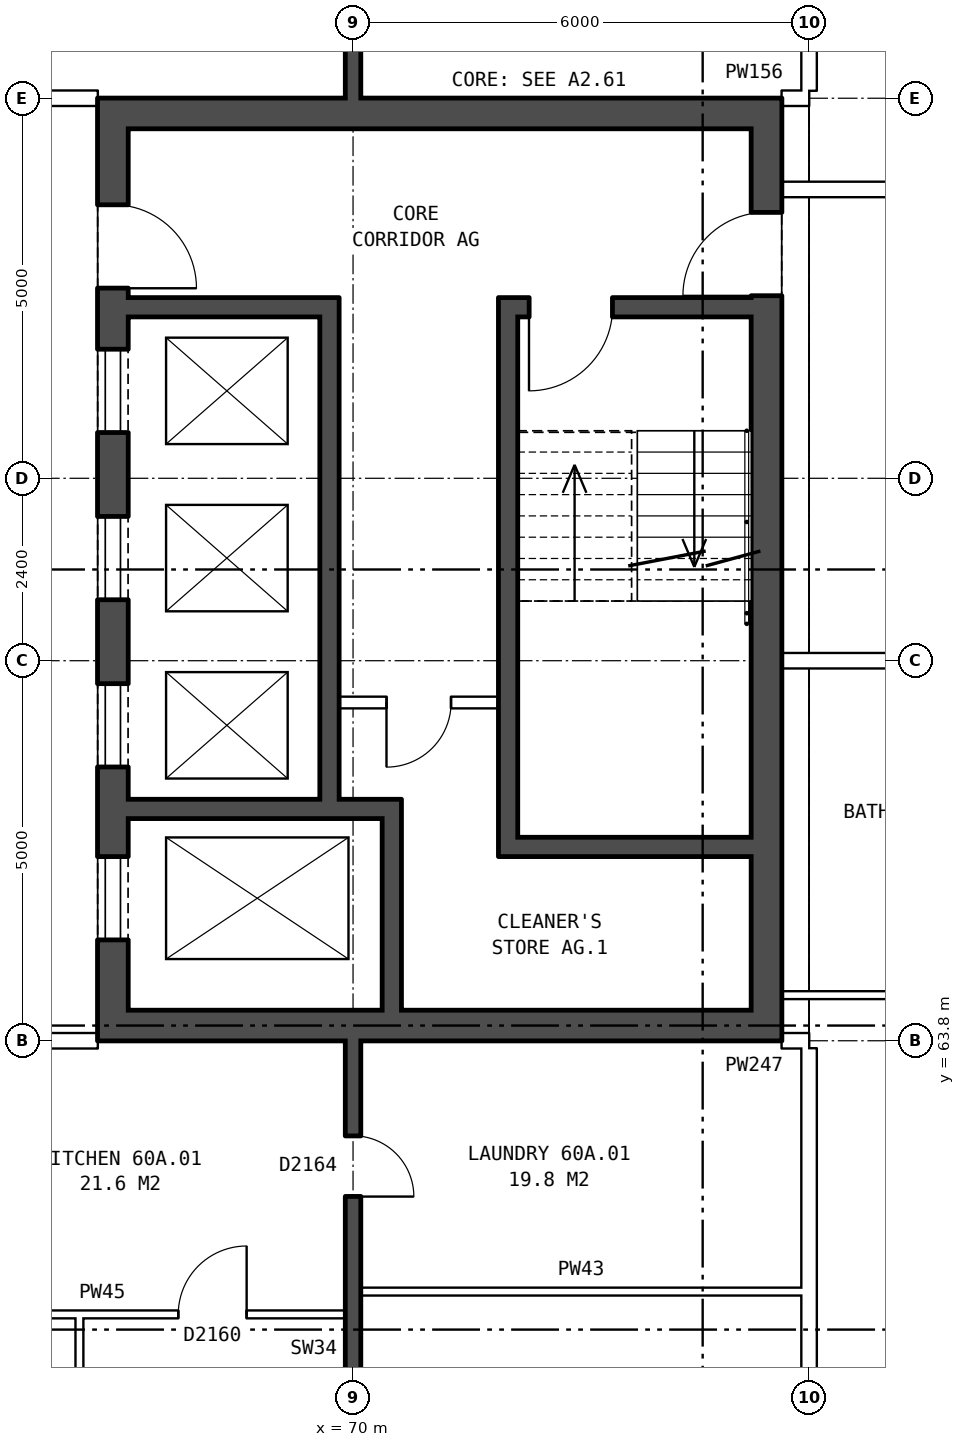
"""IFC4 building model, lengths in metres.
Left out: names, types, materials, properties, quantities, classifications, styles, units other than length and angle.
Written with IfcOpenShell. Run it as: python <this file> out.ifc"""

import sys

from ifc_helpers import new_model, si_unit, direction, frame, frame_2d, origin, place, context, subcontext, project, spatial, rectangle, extrude, element, fill, save


model = new_model("IFC4")
c1 = context("Model", 3, precision=1e-05, world=origin(), true_north=direction((0.0, 1.0)))
c2 = subcontext(c1, "Body", "Model", "MODEL_VIEW")
j1 = project(units=[si_unit("LENGTHUNIT", "METRE"), si_unit("PLANEANGLEUNIT", "RADIAN")], contexts=[c1])
p1 = place(None, origin())
s1 = spatial("IfcSite", under=j1, at=p1, CompositionType="ELEMENT")
p2 = place(p1, origin())
s2 = spatial("IfcBuilding", under=s1, at=p2, CompositionType="ELEMENT")
p3 = place(p2, frame((0.0, 0.0, 212.1)))
s3 = spatial("IfcBuildingStorey", under=s2, at=p3, CompositionType="ELEMENT", Elevation=212.1)
p4 = place(p3, frame((66.84, 63.8, 0.0), z_axis=(0.0, 0.0, 1.0), x_axis=(0.0, 1.0, 0.0)))
e1 = element("IfcWall", 1, at=p4, inside=s3, PredefinedType="SHEAR", context=c2, shape_type="SweptSolid", body=[
    extrude(rectangle(XDim=12.4, YDim=0.4, at=frame_2d((6.2, 0.0))), origin(), (0.0, 0.0, 1.0), 2.85),
])
p5 = place(p4, frame((1.325, 0.0, 0.0)))
e2 = element("IfcOpeningElement", 2, at=p5, cuts=e1, PredefinedType="OPENING", context=c2, shape_type="SweptSolid", body=[
    extrude(rectangle(XDim=1.1, YDim=2.1, at=frame_2d((0.55, 1.05))), frame((0.0, 0.21, 0.0), z_axis=(0.0, -1.0, 0.0), x_axis=(1.0, 0.0, 0.0)), (0.0, 0.0, 1.0), 0.42),
])
p6 = place(p4, frame((3.6, 0.0, 0.0)))
e3 = element("IfcOpeningElement", 3, at=p6, cuts=e1, PredefinedType="OPENING", context=c2, shape_type="SweptSolid", body=[
    extrude(rectangle(XDim=1.1, YDim=2.1, at=frame_2d((0.55, 1.05))), frame((0.0, 0.21, 0.0), z_axis=(0.0, -1.0, 0.0), x_axis=(1.0, 0.0, 0.0)), (0.0, 0.0, 1.0), 0.42),
])
p7 = place(p4, frame((5.8, 0.0, 0.0)))
e4 = element("IfcOpeningElement", 4, at=p7, cuts=e1, PredefinedType="OPENING", context=c2, shape_type="SweptSolid", body=[
    extrude(rectangle(XDim=1.1, YDim=2.1, at=frame_2d((0.55, 1.05))), frame((0.0, 0.21, 0.0), z_axis=(0.0, -1.0, 0.0), x_axis=(1.0, 0.0, 0.0)), (0.0, 0.0, 1.0), 0.42),
])
p8 = place(p4, frame((8.0, 0.0, 0.0)))
e5 = element("IfcOpeningElement", 5, at=p8, cuts=e1, PredefinedType="OPENING", context=c2, shape_type="SweptSolid", body=[
    extrude(rectangle(XDim=1.1, YDim=2.1, at=frame_2d((0.55, 1.05))), frame((0.0, 0.21, 0.0), z_axis=(0.0, -1.0, 0.0), x_axis=(1.0, 0.0, 0.0)), (0.0, 0.0, 1.0), 0.42),
])
p9 = place(p4, frame((9.9, 0.0, 0.0)))
e6 = element("IfcOpeningElement", 6, at=p9, cuts=e1, PredefinedType="OPENING", context=c2, shape_type="SweptSolid", body=[
    extrude(rectangle(XDim=1.1, YDim=2.1, at=frame_2d((0.55, 1.05))), frame((0.0, 0.21, 0.0), z_axis=(0.0, -1.0, 0.0), x_axis=(1.0, 0.0, 0.0)), (0.0, 0.0, 1.0), 0.42),
])
p10 = place(p3, frame((75.44, 63.8, 0.0), z_axis=(0.0, 0.0, 1.0), x_axis=(0.0, 1.0, 0.0)))
e7 = element("IfcWall", 7, at=p10, inside=s3, PredefinedType="SHEAR", context=c2, shape_type="SweptSolid", body=[
    extrude(rectangle(XDim=12.4, YDim=0.4, at=frame_2d((6.2, 0.0))), origin(), (0.0, 0.0, 1.0), 2.85),
])
p11 = place(p10, frame((9.8, 0.0, 0.0)))
e8 = element("IfcOpeningElement", 8, at=p11, cuts=e7, PredefinedType="OPENING", context=c2, shape_type="SweptSolid", body=[
    extrude(rectangle(XDim=1.1, YDim=2.1, at=frame_2d((0.55, 1.05))), frame((0.0, 0.21, 0.0), z_axis=(0.0, -1.0, 0.0), x_axis=(1.0, 0.0, 0.0)), (0.0, 0.0, 1.0), 0.42),
])
for number, where, z_axis, x_axis in (
    (9, (67.04, 64.0, 0.0), (0.0, 0.0, 1.0), (1.0, 0.0, 0.0)),
    (10, (67.04, 76.0, 0.0), (0.0, 0.0, 1.0), (1.0, 0.0, 0.0)),
):
    element("IfcWall", number, at=place(p3, frame(where, z_axis=z_axis, x_axis=x_axis)), inside=s3, PredefinedType="SHEAR", context=c2, shape_type="SweptSolid", body=[
        extrude(rectangle(XDim=8.2, YDim=0.4, at=frame_2d((4.1, 0.0))), origin(), (0.0, 0.0, 1.0), 2.85),
    ])
p12 = place(p3, frame((72.165, 66.35, 0.0), z_axis=(0.0, 0.0, 1.0), x_axis=(1.0, 0.0, 0.0)))
e11 = element("IfcWall", 11, at=p12, inside=s3, PredefinedType="SHEAR", context=c2, shape_type="SweptSolid", body=[
    extrude(rectangle(XDim=3.075, YDim=0.25, at=frame_2d((1.538, 0.0))), origin(), (0.0, 0.0, 1.0), 2.85),
])
p13 = place(p3, frame((67.04, 66.85, 0.0), z_axis=(0.0, 0.0, 1.0), x_axis=(1.0, 0.0, 0.0)))
e12 = element("IfcWall", 12, at=p13, inside=s3, PredefinedType="SHEAR", context=c2, shape_type="SweptSolid", body=[
    extrude(rectangle(XDim=3.595, YDim=0.25, at=frame_2d((1.797, 0.0))), origin(), (0.0, 0.0, 1.0), 2.85),
])
p14 = place(p3, frame((69.815, 68.25, 0.0), z_axis=(0.0, 0.0, 1.0), x_axis=(1.0, 0.0, 0.0)))
e13 = element("IfcWall", 13, at=p14, inside=s3, PredefinedType="PARTITIONING", context=c2, shape_type="SweptSolid", body=[
    extrude(rectangle(XDim=2.1, YDim=0.15, at=frame_2d((1.05, 0.0))), origin(), (0.0, 0.0, 1.0), 2.85),
])
p15 = place(p14, frame((0.625, 0.0, 0.0)))
e14 = element("IfcOpeningElement", 14, at=p15, cuts=e13, PredefinedType="OPENING", context=c2, shape_type="SweptSolid", body=[
    extrude(rectangle(XDim=0.85, YDim=2.1, at=frame_2d((0.425, 1.05))), frame((0.0, 0.085, 0.0), z_axis=(0.0, -1.0, 0.0), x_axis=(1.0, 0.0, 0.0)), (0.0, 0.0, 1.0), 0.17),
])
p16 = place(p3, frame((67.04, 73.45, 0.0), z_axis=(0.0, 0.0, 1.0), x_axis=(1.0, 0.0, 0.0)))
e15 = element("IfcWall", 15, at=p16, inside=s3, PredefinedType="SHEAR", context=c2, shape_type="SweptSolid", body=[
    extrude(rectangle(XDim=2.525, YDim=0.25, at=frame_2d((1.262, 0.0))), origin(), (0.0, 0.0, 1.0), 2.85),
])
p17 = place(p3, frame((72.165, 73.45, 0.0), z_axis=(0.0, 0.0, 1.0), x_axis=(1.0, 0.0, 0.0)))
e16 = element("IfcWall", 16, at=p17, inside=s3, PredefinedType="SHEAR", context=c2, shape_type="SweptSolid", body=[
    extrude(rectangle(XDim=3.075, YDim=0.25, at=frame_2d((1.538, 0.0))), origin(), (0.0, 0.0, 1.0), 2.85),
])
p18 = place(p17, frame((0.15, 0.0, 0.0)))
e17 = element("IfcOpeningElement", 17, at=p18, cuts=e16, PredefinedType="OPENING", context=c2, shape_type="SweptSolid", body=[
    extrude(rectangle(XDim=1.1, YDim=2.1, at=frame_2d((0.55, 1.05))), frame((0.0, 0.135, 0.0), z_axis=(0.0, -1.0, 0.0), x_axis=(1.0, 0.0, 0.0)), (0.0, 0.0, 1.0), 0.27),
])
p19 = place(p3, frame((69.69, 66.975, 0.0), z_axis=(0.0, 0.0, 1.0), x_axis=(0.0, 1.0, 0.0)))
e18 = element("IfcWall", 18, at=p19, inside=s3, PredefinedType="SHEAR", context=c2, shape_type="SweptSolid", body=[
    extrude(rectangle(XDim=6.6, YDim=0.25, at=frame_2d((3.3, 0.0))), origin(), (0.0, 0.0, 1.0), 2.85),
])
p20 = place(p3, frame((70.51, 64.2, 0.0), z_axis=(0.0, 0.0, 1.0), x_axis=(0.0, 1.0, 0.0)))
e19 = element("IfcWall", 19, at=p20, inside=s3, PredefinedType="SHEAR", context=c2, shape_type="SweptSolid", body=[
    extrude(rectangle(XDim=2.525, YDim=0.25, at=frame_2d((1.263, 0.0))), origin(), (0.0, 0.0, 1.0), 2.85),
])
p21 = place(p3, frame((72.04, 66.225, 0.0), z_axis=(0.0, 0.0, 1.0), x_axis=(0.0, 1.0, 0.0)))
e20 = element("IfcWall", 20, at=p21, inside=s3, PredefinedType="SHEAR", context=c2, shape_type="SweptSolid", body=[
    extrude(rectangle(XDim=7.35, YDim=0.25, at=frame_2d((3.675, 0.0))), origin(), (0.0, 0.0, 1.0), 2.85),
])
p22 = place(p3, frame((64.1, 60.2, 0.0), z_axis=(0.0, 0.0, 1.0), x_axis=(1.0, 0.0, 0.0)))
e21 = element("IfcWall", 21, at=p22, inside=s3, PredefinedType="PARTITIONING", context=c2, shape_type="SweptSolid", body=[
    extrude(rectangle(XDim=5.8, YDim=0.1, at=frame_2d((2.9, 0.0))), origin(), (0.0, 0.0, 1.0), 2.85),
])
p23 = place(p22, frame((3.6, 0.0, 0.0)))
e22 = element("IfcOpeningElement", 22, at=p23, cuts=e21, PredefinedType="OPENING", context=c2, shape_type="SweptSolid", body=[
    extrude(rectangle(XDim=0.9, YDim=2.1, at=frame_2d((0.45, 1.05))), frame((0.0, 0.06, 0.0), z_axis=(0.0, -1.0, 0.0), x_axis=(1.0, 0.0, 0.0)), (0.0, 0.0, 1.0), 0.12),
])
p24 = place(p22, frame((0.7, 0.0, 0.0)))
e23 = element("IfcOpeningElement", 23, at=p24, cuts=e21, PredefinedType="OPENING", context=c2, shape_type="SweptSolid", body=[
    extrude(rectangle(XDim=0.9, YDim=2.1, at=frame_2d((0.45, 1.05))), frame((0.0, 0.06, 0.0), z_axis=(0.0, -1.0, 0.0), x_axis=(1.0, 0.0, 0.0)), (0.0, 0.0, 1.0), 0.12),
])
p25 = place(p3, frame((70.1, 60.5, 0.0), z_axis=(0.0, 0.0, 1.0), x_axis=(1.0, 0.0, 0.0)))
e24 = element("IfcWall", 24, at=p25, inside=s3, PredefinedType="PARTITIONING", context=c2, shape_type="SweptSolid", body=[
    extrude(rectangle(XDim=5.8, YDim=0.1, at=frame_2d((2.9, 0.0))), origin(), (0.0, 0.0, 1.0), 2.85),
])
p26 = place(p3, frame((63.64, 63.8, 0.0), z_axis=(0.0, 0.0, 1.0), x_axis=(1.0, 0.0, 0.0)))
e25 = element("IfcWall", 25, at=p26, inside=s3, PredefinedType="PARTITIONING", context=c2, shape_type="SweptSolid", body=[
    extrude(rectangle(XDim=3.0, YDim=0.2, at=frame_2d((1.5, 0.0))), origin(), (0.0, 0.0, 1.0), 2.85),
])
p27 = place(p26, frame((1.18, 0.0, 0.0)))
e26 = element("IfcOpeningElement", 26, at=p27, cuts=e25, PredefinedType="OPENING", context=c2, shape_type="SweptSolid", body=[
    extrude(rectangle(XDim=1.0, YDim=2.1, at=frame_2d((0.5, 1.05))), frame((0.0, 0.11, 0.0), z_axis=(0.0, -1.0, 0.0), x_axis=(1.0, 0.0, 0.0)), (0.0, 0.0, 1.0), 0.22),
])
p28 = place(p3, frame((75.64, 63.8, 0.0), z_axis=(0.0, 0.0, 1.0), x_axis=(1.0, 0.0, 0.0)))
e27 = element("IfcWall", 27, at=p28, inside=s3, PredefinedType="PARTITIONING", context=c2, shape_type="SweptSolid", body=[
    extrude(rectangle(XDim=0.36, YDim=0.2, at=frame_2d((0.18, 0.0))), origin(), (0.0, 0.0, 1.0), 2.85),
])
p29 = place(p3, frame((75.64, 64.4, 0.0), z_axis=(0.0, 0.0, 1.0), x_axis=(1.0, 0.0, 0.0)))
e28 = element("IfcWall", 28, at=p29, inside=s3, PredefinedType="PARTITIONING", context=c2, shape_type="SweptSolid", body=[
    extrude(rectangle(XDim=3.798, YDim=0.1, at=frame_2d((1.899, 0.0))), origin(), (0.0, 0.0, 1.0), 2.85),
])
p30 = place(p3, frame((75.64, 68.8, 0.0), z_axis=(0.0, 0.0, 1.0), x_axis=(1.0, 0.0, 0.0)))
e29 = element("IfcWall", 29, at=p30, inside=s3, PredefinedType="PARTITIONING", context=c2, shape_type="SweptSolid", body=[
    extrude(rectangle(XDim=55.72, YDim=0.2, at=frame_2d((27.86, 0.0))), origin(), (0.0, 0.0, 1.0), 2.85),
])
p31 = place(p30, frame((5.191, 0.0, 0.0)))
e30 = element("IfcOpeningElement", 30, at=p31, cuts=e29, PredefinedType="OPENING", context=c2, shape_type="SweptSolid", body=[
    extrude(rectangle(XDim=1.0, YDim=2.1, at=frame_2d((0.5, 1.05))), frame((0.0, 0.11, 0.0), z_axis=(0.0, -1.0, 0.0), x_axis=(1.0, 0.0, 0.0)), (0.0, 0.0, 1.0), 0.22),
])
p32 = place(p30, frame((15.678, 0.0, 0.0)))
e31 = element("IfcOpeningElement", 31, at=p32, cuts=e29, PredefinedType="OPENING", context=c2, shape_type="SweptSolid", body=[
    extrude(rectangle(XDim=1.0, YDim=2.1, at=frame_2d((0.5, 1.05))), frame((0.0, 0.11, 0.0), z_axis=(0.0, -1.0, 0.0), x_axis=(1.0, 0.0, 0.0)), (0.0, 0.0, 1.0), 0.22),
])
p33 = place(p30, frame((22.553, 0.0, 0.0)))
e32 = element("IfcOpeningElement", 32, at=p33, cuts=e29, PredefinedType="OPENING", context=c2, shape_type="SweptSolid", body=[
    extrude(rectangle(XDim=1.0, YDim=2.1, at=frame_2d((0.5, 1.05))), frame((0.0, 0.11, 0.0), z_axis=(0.0, -1.0, 0.0), x_axis=(1.0, 0.0, 0.0)), (0.0, 0.0, 1.0), 0.22),
])
p34 = place(p30, frame((32.866, 0.0, 0.0)))
e33 = element("IfcOpeningElement", 33, at=p34, cuts=e29, PredefinedType="OPENING", context=c2, shape_type="SweptSolid", body=[
    extrude(rectangle(XDim=1.0, YDim=2.1, at=frame_2d((0.5, 1.05))), frame((0.0, 0.11, 0.0), z_axis=(0.0, -1.0, 0.0), x_axis=(1.0, 0.0, 0.0)), (0.0, 0.0, 1.0), 0.22),
])
p35 = place(p30, frame((43.178, 0.0, 0.0)))
e34 = element("IfcOpeningElement", 34, at=p35, cuts=e29, PredefinedType="OPENING", context=c2, shape_type="SweptSolid", body=[
    extrude(rectangle(XDim=1.0, YDim=2.1, at=frame_2d((0.5, 1.05))), frame((0.0, 0.11, 0.0), z_axis=(0.0, -1.0, 0.0), x_axis=(1.0, 0.0, 0.0)), (0.0, 0.0, 1.0), 0.22),
])
p36 = place(p30, frame((50.053, 0.0, 0.0)))
e35 = element("IfcOpeningElement", 35, at=p36, cuts=e29, PredefinedType="OPENING", context=c2, shape_type="SweptSolid", body=[
    extrude(rectangle(XDim=1.0, YDim=2.1, at=frame_2d((0.5, 1.05))), frame((0.0, 0.11, 0.0), z_axis=(0.0, -1.0, 0.0), x_axis=(1.0, 0.0, 0.0)), (0.0, 0.0, 1.0), 0.22),
])
p37 = place(p3, frame((75.64, 75.0, 0.0), z_axis=(0.0, 0.0, 1.0), x_axis=(1.0, 0.0, 0.0)))
e36 = element("IfcWall", 36, at=p37, inside=s3, PredefinedType="PARTITIONING", context=c2, shape_type="SweptSolid", body=[
    extrude(rectangle(XDim=7.585, YDim=0.2, at=frame_2d((3.792, 0.0))), origin(), (0.0, 0.0, 1.0), 2.85),
])
p38 = place(p37, frame((3.343, 0.0, 0.0)))
e37 = element("IfcOpeningElement", 37, at=p38, cuts=e36, PredefinedType="OPENING", context=c2, shape_type="SweptSolid", body=[
    extrude(rectangle(XDim=0.9, YDim=2.1, at=frame_2d((0.45, 1.05))), frame((0.0, 0.11, 0.0), z_axis=(0.0, -1.0, 0.0), x_axis=(1.0, 0.0, 0.0)), (0.0, 0.0, 1.0), 0.22),
])
p39 = place(p3, frame((63.64, 76.2, 0.0), z_axis=(0.0, 0.0, 1.0), x_axis=(1.0, 0.0, 0.0)))
e38 = element("IfcWall", 38, at=p39, inside=s3, PredefinedType="PARTITIONING", context=c2, shape_type="SweptSolid", body=[
    extrude(rectangle(XDim=3.0, YDim=0.2, at=frame_2d((1.5, 0.0))), origin(), (0.0, 0.0, 1.0), 2.85),
])
p40 = place(p39, frame((1.18, 0.0, 0.0)))
e39 = element("IfcOpeningElement", 39, at=p40, cuts=e38, PredefinedType="OPENING", context=c2, shape_type="SweptSolid", body=[
    extrude(rectangle(XDim=1.0, YDim=2.1, at=frame_2d((0.5, 1.05))), frame((0.0, 0.11, 0.0), z_axis=(0.0, -1.0, 0.0), x_axis=(1.0, 0.0, 0.0)), (0.0, 0.0, 1.0), 0.22),
])
p41 = place(p3, frame((75.64, 76.2, 0.0), z_axis=(0.0, 0.0, 1.0), x_axis=(1.0, 0.0, 0.0)))
e40 = element("IfcWall", 40, at=p41, inside=s3, PredefinedType="PARTITIONING", context=c2, shape_type="SweptSolid", body=[
    extrude(rectangle(XDim=0.36, YDim=0.2, at=frame_2d((0.18, 0.0))), origin(), (0.0, 0.0, 1.0), 2.85),
])
p42 = place(p3, frame((66.4, 57.85, 0.0), z_axis=(0.0, 0.0, 1.0), x_axis=(0.0, 1.0, 0.0)))
e41 = element("IfcWall", 41, at=p42, inside=s3, PredefinedType="PARTITIONING", context=c2, shape_type="SweptSolid", body=[
    extrude(rectangle(XDim=2.3, YDim=0.1, at=frame_2d((1.15, 0.0))), origin(), (0.0, 0.0, 1.0), 2.85),
])
p43 = place(p3, frame((70.0, 54.36, 0.0), z_axis=(0.0, 0.0, 1.0), x_axis=(0.0, 1.0, 0.0)))
e42 = element("IfcWall", 42, at=p43, inside=s3, PredefinedType="SOLIDWALL", context=c2, shape_type="SweptSolid", body=[
    extrude(rectangle(XDim=9.44, YDim=0.2, at=frame_2d((4.72, 0.0))), origin(), (0.0, 0.0, 1.0), 2.85),
])
p44 = place(p43, frame((2.47, 0.0, 0.0)))
e43 = element("IfcOpeningElement", 43, at=p44, cuts=e42, PredefinedType="OPENING", context=c2, shape_type="SweptSolid", body=[
    extrude(rectangle(XDim=0.9, YDim=2.1, at=frame_2d((0.45, 1.05))), frame((0.0, 0.11, 0.0), z_axis=(0.0, -1.0, 0.0), x_axis=(1.0, 0.0, 0.0)), (0.0, 0.0, 1.0), 0.22),
])
p45 = place(p43, frame((7.39, 0.0, 0.0)))
e44 = element("IfcOpeningElement", 44, at=p45, cuts=e42, PredefinedType="OPENING", context=c2, shape_type="SweptSolid", body=[
    extrude(rectangle(XDim=0.8, YDim=2.1, at=frame_2d((0.4, 1.05))), frame((0.0, 0.11, 0.0), z_axis=(0.0, -1.0, 0.0), x_axis=(1.0, 0.0, 0.0)), (0.0, 0.0, 1.0), 0.22),
])
p46 = place(p3, frame((70.0, 76.2, 0.0), z_axis=(0.0, 0.0, 1.0), x_axis=(0.0, 1.0, 0.0)))
e45 = element("IfcWall", 45, at=p46, inside=s3, PredefinedType="SOLIDWALL", context=c2, shape_type="SweptSolid", body=[
    extrude(rectangle(XDim=9.44, YDim=0.2, at=frame_2d((4.72, 0.0))), origin(), (0.0, 0.0, 1.0), 2.85),
])
p47 = place(p46, frame((6.22, 0.0, 0.0)))
e46 = element("IfcOpeningElement", 46, at=p47, cuts=e45, PredefinedType="OPENING", context=c2, shape_type="SweptSolid", body=[
    extrude(rectangle(XDim=0.9, YDim=2.1, at=frame_2d((0.45, 1.05))), frame((0.0, 0.11, 0.0), z_axis=(0.0, -1.0, 0.0), x_axis=(1.0, 0.0, 0.0)), (0.0, 0.0, 1.0), 0.22),
])
p48 = place(p46, frame((1.25, 0.0, 0.0)))
e47 = element("IfcOpeningElement", 47, at=p48, cuts=e45, PredefinedType="OPENING", context=c2, shape_type="SweptSolid", body=[
    extrude(rectangle(XDim=0.8, YDim=2.1, at=frame_2d((0.4, 1.05))), frame((0.0, 0.11, 0.0), z_axis=(0.0, -1.0, 0.0), x_axis=(1.0, 0.0, 0.0)), (0.0, 0.0, 1.0), 0.22),
])
for number, where, z_axis, x_axis in (
    (48, (76.0, 54.36, 0.0), (0.0, 0.0, 1.0), (0.0, 1.0, 0.0)),
    (49, (76.0, 76.3, 0.0), (0.0, 0.0, 1.0), (0.0, 1.0, 0.0)),
):
    element("IfcWall", number, at=place(p3, frame(where, z_axis=z_axis, x_axis=x_axis)), inside=s3, PredefinedType="PARTITIONING", context=c2, shape_type="SweptSolid", body=[
        extrude(rectangle(XDim=9.34, YDim=0.2, at=frame_2d((4.67, 0.0))), origin(), (0.0, 0.0, 1.0), 2.85),
    ])
p49 = place(p5, origin())
e50 = element("IfcDoor", 50, at=p49, inside=s3, OperationType="DOUBLE_DOOR_SLIDING", PredefinedType="DOOR", context=c2, shape_type="SweptSolid", body=[
    extrude(rectangle(XDim=1.1, YDim=2.1, at=frame_2d((0.55, 1.05))), frame((0.0, -0.135, 0.0), z_axis=(0.0, -1.0, 0.0), x_axis=(1.0, 0.0, 0.0)), (0.0, 0.0, 1.0), 0.05),
])
fill(e2, e50)
p50 = place(p6, origin())
e51 = element("IfcDoor", 51, at=p50, inside=s3, OperationType="DOUBLE_DOOR_SLIDING", PredefinedType="DOOR", context=c2, shape_type="SweptSolid", body=[
    extrude(rectangle(XDim=1.1, YDim=2.1, at=frame_2d((0.55, 1.05))), frame((0.0, -0.135, 0.0), z_axis=(0.0, -1.0, 0.0), x_axis=(1.0, 0.0, 0.0)), (0.0, 0.0, 1.0), 0.05),
])
fill(e3, e51)
p51 = place(p7, origin())
e52 = element("IfcDoor", 52, at=p51, inside=s3, OperationType="DOUBLE_DOOR_SLIDING", PredefinedType="DOOR", context=c2, shape_type="SweptSolid", body=[
    extrude(rectangle(XDim=1.1, YDim=2.1, at=frame_2d((0.55, 1.05))), frame((0.0, -0.135, 0.0), z_axis=(0.0, -1.0, 0.0), x_axis=(1.0, 0.0, 0.0)), (0.0, 0.0, 1.0), 0.05),
])
fill(e4, e52)
p52 = place(p8, origin())
e53 = element("IfcDoor", 53, at=p52, inside=s3, OperationType="DOUBLE_DOOR_SLIDING", PredefinedType="DOOR", context=c2, shape_type="SweptSolid", body=[
    extrude(rectangle(XDim=1.1, YDim=2.1, at=frame_2d((0.55, 1.05))), frame((0.0, -0.135, 0.0), z_axis=(0.0, -1.0, 0.0), x_axis=(1.0, 0.0, 0.0)), (0.0, 0.0, 1.0), 0.05),
])
fill(e5, e53)
p53 = place(p9, frame((1.1, 0.0, 0.0), z_axis=(0.0, 0.0, 1.0), x_axis=(-1.0, 0.0, 0.0)))
e54 = element("IfcDoor", 54, at=p53, inside=s3, OperationType="SINGLE_SWING_RIGHT", PredefinedType="DOOR", context=c2, shape_type="SweptSolid", body=[
    extrude(rectangle(XDim=1.1, YDim=2.1, at=frame_2d((0.55, 1.05))), frame((0.0, 0.185, 0.0), z_axis=(0.0, -1.0, 0.0), x_axis=(1.0, 0.0, 0.0)), (0.0, 0.0, 1.0), 0.05),
])
fill(e6, e54)
p54 = place(p18, frame((1.1, 0.0, 0.0), z_axis=(0.0, 0.0, 1.0), x_axis=(-1.0, 0.0, 0.0)))
e55 = element("IfcDoor", 55, at=p54, inside=s3, OperationType="SINGLE_SWING_RIGHT", PredefinedType="DOOR", context=c2, shape_type="SweptSolid", body=[
    extrude(rectangle(XDim=1.1, YDim=2.1, at=frame_2d((0.55, 1.05))), frame((0.0, 0.025, 0.0), z_axis=(0.0, -1.0, 0.0), x_axis=(1.0, 0.0, 0.0)), (0.0, 0.0, 1.0), 0.05),
])
fill(e17, e55)
p55 = place(p15, frame((0.85, 0.0, 0.0), z_axis=(0.0, 0.0, 1.0), x_axis=(-1.0, 0.0, 0.0)))
e56 = element("IfcDoor", 56, at=p55, inside=s3, OperationType="SINGLE_SWING_RIGHT", PredefinedType="DOOR", context=c2, shape_type="SweptSolid", body=[
    extrude(rectangle(XDim=0.85, YDim=2.1, at=frame_2d((0.425, 1.05))), frame((0.0, 0.025, 0.0), z_axis=(0.0, -1.0, 0.0), x_axis=(1.0, 0.0, 0.0)), (0.0, 0.0, 1.0), 0.05),
])
fill(e14, e56)
p56 = place(p11, origin())
e57 = element("IfcDoor", 57, at=p56, inside=s3, OperationType="SINGLE_SWING_LEFT", PredefinedType="DOOR", context=c2, shape_type="SweptSolid", body=[
    extrude(rectangle(XDim=1.1, YDim=2.1, at=frame_2d((0.55, 1.05))), frame((0.0, 0.185, 0.0), z_axis=(0.0, -1.0, 0.0), x_axis=(1.0, 0.0, 0.0)), (0.0, 0.0, 1.0), 0.05),
])
fill(e8, e57)
p57 = place(p23, origin())
e58 = element("IfcDoor", 58, at=p57, inside=s3, OperationType="SINGLE_SWING_RIGHT", PredefinedType="DOOR", context=c2, shape_type="SweptSolid", body=[
    extrude(rectangle(XDim=0.9, YDim=2.1, at=frame_2d((0.45, 1.05))), frame((0.0, 0.025, 0.0), z_axis=(0.0, -1.0, 0.0), x_axis=(1.0, 0.0, 0.0)), (0.0, 0.0, 1.0), 0.05),
])
fill(e22, e58)
p58 = place(p45, frame((0.8, 0.0, 0.0), z_axis=(0.0, 0.0, 1.0), x_axis=(-1.0, 0.0, 0.0)))
e59 = element("IfcDoor", 59, at=p58, inside=s3, OperationType="SINGLE_SWING_RIGHT", PredefinedType="DOOR", context=c2, shape_type="SweptSolid", body=[
    extrude(rectangle(XDim=0.8, YDim=2.1, at=frame_2d((0.4, 1.05))), frame((0.0, 0.025, 0.0), z_axis=(0.0, -1.0, 0.0), x_axis=(1.0, 0.0, 0.0)), (0.0, 0.0, 1.0), 0.05),
])
fill(e44, e59)
save(model, sys.argv[1])
